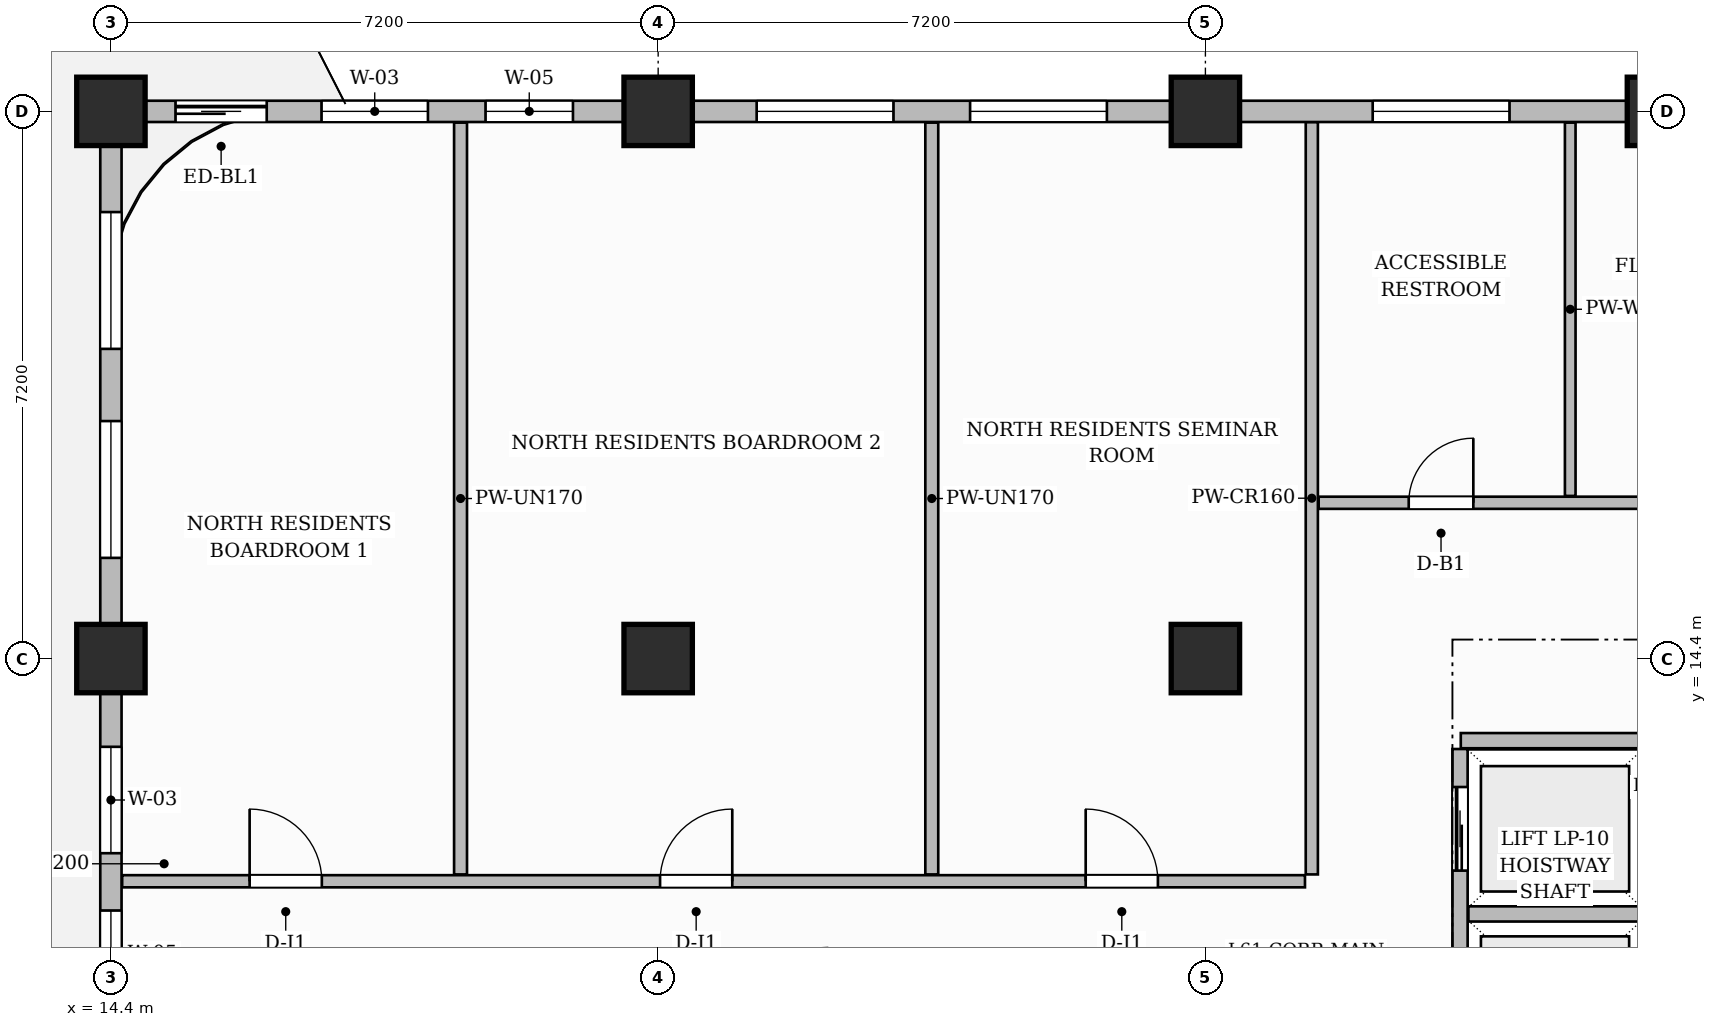
"""IFC4 building model, lengths in metres.
Left out: names, types, materials, properties, quantities, classifications, styles, units other than length and angle.
Written with IfcOpenShell. Run it as: python <this file> out.ifc"""

import sys

from ifc_helpers import new_model, si_unit, direction, frame, frame_2d, origin, origin_2d, place, context, subcontext, project, spatial, rectangle, extrude, source, transform, mapped, element, fill, save


model = new_model("IFC4")
c1 = context("Model", 3, precision=1e-05, world=origin(), true_north=direction((0.0, 1.0)))
c2 = subcontext(c1, "Body", "Model", "MODEL_VIEW")
j1 = project(units=[si_unit("LENGTHUNIT", "METRE"), si_unit("PLANEANGLEUNIT", "RADIAN")], contexts=[c1])
p1 = place(None, origin())
s1 = spatial("IfcSite", under=j1, at=p1, CompositionType="ELEMENT")
p2 = place(p1, origin())
s2 = spatial("IfcBuilding", under=s1, at=p2, CompositionType="ELEMENT")
p3 = place(p2, frame((0.0, 0.0, 244.25)))
s3 = spatial("IfcBuildingStorey", under=s2, at=p3, CompositionType="ELEMENT", Elevation=244.25)
m1 = source(origin(), c2, "Body", "SweptSolid", [
    extrude(rectangle(XDim=0.9, YDim=0.9, at=origin_2d()), origin(), (0.0, 0.0, 1.0), 3.85),
])
for number, where, z_axis, x_axis in (
    (1, (14.4, 14.4, 0.0), (0.0, 0.0, 1.0), (1.0, 0.0, 0.0)),
    (2, (14.4, 21.6, 0.0), (0.0, 0.0, 1.0), (1.0, 0.0, 0.0)),
    (3, (21.6, 14.4, 0.0), (0.0, 0.0, 1.0), (1.0, 0.0, 0.0)),
    (4, (21.6, 21.6, 0.0), (0.0, 0.0, 1.0), (1.0, 0.0, 0.0)),
    (5, (28.8, 14.4, 0.0), (0.0, 0.0, 1.0), (1.0, 0.0, 0.0)),
    (6, (28.8, 21.6, 0.0), (0.0, 0.0, 1.0), (1.0, 0.0, 0.0)),
    (7, (34.8, 21.6, 0.0), (0.0, 0.0, 1.0), (1.0, 0.0, 0.0)),
):
    element("IfcColumn", number, at=place(p3, frame(where, z_axis=z_axis, x_axis=x_axis)), inside=s3, PredefinedType="COLUMN", context=c2, shape_type="MappedRepresentation", body=[
        mapped(m1, transform((0.0, 0.0, 0.0), scale=1.0)),
    ])
p4 = place(p3, frame((32.16, 13.32, 0.0), z_axis=(0.0, 0.0, 1.0), x_axis=(1.0, 0.0, 0.0)))
e8 = element("IfcWall", 8, at=p4, inside=s3, PredefinedType="PARTITIONING", context=c2, shape_type="SweptSolid", body=[
    extrude(rectangle(XDim=2.385, YDim=0.2, at=frame_2d((1.192, 0.0))), origin(), (0.0, 0.0, 1.0), 3.6),
])
p5 = place(p3, frame((32.15, 4.39, 0.0), z_axis=(0.0, 0.0, 1.0), x_axis=(0.0, 1.0, 0.0)))
e9 = element("IfcWall", 9, at=p5, inside=s3, PredefinedType="PARTITIONING", context=c2, shape_type="SweptSolid", body=[
    extrude(rectangle(XDim=8.82, YDim=0.2, at=frame_2d((4.41, 0.0))), origin(), (0.0, 0.0, 1.0), 3.6),
])
p6 = place(p5, frame((0.5, 0.0, 0.0)))
e10 = element("IfcOpeningElement", 10, at=p6, cuts=e9, PredefinedType="OPENING", context=c2, shape_type="SweptSolid", body=[
    extrude(rectangle(XDim=1.1, YDim=2.2, at=frame_2d((0.55, 1.1))), frame((0.0, 0.11, 0.0), z_axis=(0.0, -1.0, 0.0), x_axis=(1.0, 0.0, 0.0)), (0.0, 0.0, 1.0), 0.22),
])
p7 = place(p5, frame((2.74, 0.0, 0.0)))
e11 = element("IfcOpeningElement", 11, at=p7, cuts=e9, PredefinedType="OPENING", context=c2, shape_type="SweptSolid", body=[
    extrude(rectangle(XDim=1.1, YDim=2.2, at=frame_2d((0.55, 1.1))), frame((0.0, 0.11, 0.0), z_axis=(0.0, -1.0, 0.0), x_axis=(1.0, 0.0, 0.0)), (0.0, 0.0, 1.0), 0.22),
])
p8 = place(p5, frame((4.98, 0.0, 0.0)))
e12 = element("IfcOpeningElement", 12, at=p8, cuts=e9, PredefinedType="OPENING", context=c2, shape_type="SweptSolid", body=[
    extrude(rectangle(XDim=1.1, YDim=2.2, at=frame_2d((0.55, 1.1))), frame((0.0, 0.11, 0.0), z_axis=(0.0, -1.0, 0.0), x_axis=(1.0, 0.0, 0.0)), (0.0, 0.0, 1.0), 0.22),
])
p9 = place(p5, frame((7.22, 0.0, 0.0)))
e13 = element("IfcOpeningElement", 13, at=p9, cuts=e9, PredefinedType="OPENING", context=c2, shape_type="SweptSolid", body=[
    extrude(rectangle(XDim=1.1, YDim=2.2, at=frame_2d((0.55, 1.1))), frame((0.0, 0.11, 0.0), z_axis=(0.0, -1.0, 0.0), x_axis=(1.0, 0.0, 0.0)), (0.0, 0.0, 1.0), 0.22),
])
p10 = place(p3, frame((32.26, 11.04, 0.0), z_axis=(0.0, 0.0, 1.0), x_axis=(1.0, 0.0, 0.0)))
e14 = element("IfcWall", 14, at=p10, inside=s3, PredefinedType="PARTITIONING", context=c2, shape_type="SweptSolid", body=[
    extrude(rectangle(XDim=2.255, YDim=0.2, at=frame_2d((1.127, 0.0))), origin(), (0.0, 0.0, 1.0), 3.6),
])
p11 = place(p3, frame((14.548, 11.47, 0.0), z_axis=(0.0, 0.0, 1.0), x_axis=(1.0, 0.0, 0.0)))
e15 = element("IfcWall", 15, at=p11, inside=s3, PredefinedType="PARTITIONING", context=c2, shape_type="SweptSolid", body=[
    extrude(rectangle(XDim=15.562, YDim=0.16, at=frame_2d((7.781, 0.0))), origin(), (0.0, 0.0, 1.0), 3.6),
])
p12 = place(p11, frame((1.677, 0.0, 0.0)))
e16 = element("IfcOpeningElement", 16, at=p12, cuts=e15, PredefinedType="OPENING", context=c2, shape_type="SweptSolid", body=[
    extrude(rectangle(XDim=0.95, YDim=2.15, at=frame_2d((0.475, 1.075))), frame((0.0, 0.09, 0.0), z_axis=(0.0, -1.0, 0.0), x_axis=(1.0, 0.0, 0.0)), (0.0, 0.0, 1.0), 0.18),
])
p13 = place(p11, frame((7.077, 0.0, 0.0)))
e17 = element("IfcOpeningElement", 17, at=p13, cuts=e15, PredefinedType="OPENING", context=c2, shape_type="SweptSolid", body=[
    extrude(rectangle(XDim=0.95, YDim=2.15, at=frame_2d((0.475, 1.075))), frame((0.0, 0.09, 0.0), z_axis=(0.0, -1.0, 0.0), x_axis=(1.0, 0.0, 0.0)), (0.0, 0.0, 1.0), 0.18),
])
p14 = place(p11, frame((12.677, 0.0, 0.0)))
e18 = element("IfcOpeningElement", 18, at=p14, cuts=e15, PredefinedType="OPENING", context=c2, shape_type="SweptSolid", body=[
    extrude(rectangle(XDim=0.95, YDim=2.15, at=frame_2d((0.475, 1.075))), frame((0.0, 0.09, 0.0), z_axis=(0.0, -1.0, 0.0), x_axis=(1.0, 0.0, 0.0)), (0.0, 0.0, 1.0), 0.18),
])
p15 = place(p3, frame((30.2, 11.56, 0.0), z_axis=(0.0, 0.0, 1.0), x_axis=(0.0, 1.0, 0.0)))
e19 = element("IfcWall", 19, at=p15, inside=s3, PredefinedType="PARTITIONING", context=c2, shape_type="SweptSolid", body=[
    extrude(rectangle(XDim=9.9, YDim=0.16, at=frame_2d((4.95, 0.0))), origin(), (0.0, 0.0, 1.0), 3.6),
])
p16 = place(p3, frame((30.29, 16.45, 0.0), z_axis=(0.0, 0.0, 1.0), x_axis=(1.0, 0.0, 0.0)))
e20 = element("IfcWall", 20, at=p16, inside=s3, PredefinedType="PARTITIONING", context=c2, shape_type="SweptSolid", body=[
    extrude(rectangle(XDim=19.37, YDim=0.16, at=frame_2d((9.685, 0.0))), origin(), (0.0, 0.0, 1.0), 3.6),
])
p17 = place(p16, frame((1.185, 0.0, 0.0)))
e21 = element("IfcOpeningElement", 21, at=p17, cuts=e20, PredefinedType="OPENING", context=c2, shape_type="SweptSolid", body=[
    extrude(rectangle(XDim=0.85, YDim=2.1, at=frame_2d((0.425, 1.05))), frame((0.0, 0.09, 0.0), z_axis=(0.0, -1.0, 0.0), x_axis=(1.0, 0.0, 0.0)), (0.0, 0.0, 1.0), 0.18),
])
p18 = place(p16, frame((6.66, 0.0, 0.0)))
e22 = element("IfcOpeningElement", 22, at=p18, cuts=e20, PredefinedType="OPENING", context=c2, shape_type="SweptSolid", body=[
    extrude(rectangle(XDim=0.9, YDim=2.15, at=frame_2d((0.45, 1.075))), frame((0.0, 0.09, 0.0), z_axis=(0.0, -1.0, 0.0), x_axis=(1.0, 0.0, 0.0)), (0.0, 0.0, 1.0), 0.18),
])
p19 = place(p16, frame((14.46, 0.0, 0.0)))
e23 = element("IfcOpeningElement", 23, at=p19, cuts=e20, PredefinedType="OPENING", context=c2, shape_type="SweptSolid", body=[
    extrude(rectangle(XDim=1.4, YDim=2.35, at=frame_2d((0.7, 1.175))), frame((0.0, 0.09, 0.0), z_axis=(0.0, -1.0, 0.0), x_axis=(1.0, 0.0, 0.0)), (0.0, 0.0, 1.0), 0.18),
])
p20 = place(p3, frame((33.6, 16.54, 0.0), z_axis=(0.0, 0.0, 1.0), x_axis=(0.0, 1.0, 0.0)))
e24 = element("IfcWall", 24, at=p20, inside=s3, PredefinedType="PARTITIONING", context=c2, shape_type="SweptSolid", body=[
    extrude(rectangle(XDim=4.912, YDim=0.14, at=frame_2d((2.456, 0.0))), origin(), (0.0, 0.0, 1.0), 3.6),
])
p21 = place(p3, frame((19.0, 11.56, 0.0), z_axis=(0.0, 0.0, 1.0), x_axis=(0.0, 1.0, 0.0)))
e25 = element("IfcWall", 25, at=p21, inside=s3, PredefinedType="PARTITIONING", context=c2, shape_type="SweptSolid", body=[
    extrude(rectangle(XDim=9.892, YDim=0.17, at=frame_2d((4.946, 0.0))), origin(), (0.0, 0.0, 1.0), 3.6),
])
p22 = place(p3, frame((25.2, 11.56, 0.0), z_axis=(0.0, 0.0, 1.0), x_axis=(0.0, 1.0, 0.0)))
e26 = element("IfcWall", 26, at=p22, inside=s3, PredefinedType="PARTITIONING", context=c2, shape_type="SweptSolid", body=[
    extrude(rectangle(XDim=9.892, YDim=0.17, at=frame_2d((4.946, 0.0))), origin(), (0.0, 0.0, 1.0), 3.315),
])
p23 = place(p3, frame((14.4, 21.6, 0.0), z_axis=(0.0, 0.0, 1.0), x_axis=(1.0, 0.0, 0.0)))
e27 = element("IfcWall", 27, at=p23, inside=s3, PredefinedType="SOLIDWALL", context=c2, shape_type="SweptSolid", body=[
    extrude(rectangle(XDim=35.4, YDim=0.28, at=frame_2d((17.7, 0.0))), origin(), (0.0, 0.0, 1.0), 3.135),
])
p24 = place(p23, frame((0.85, 0.0, 0.0)))
e28 = element("IfcOpeningElement", 28, at=p24, cuts=e27, PredefinedType="OPENING", context=c2, shape_type="SweptSolid", body=[
    extrude(rectangle(XDim=1.2, YDim=2.2, at=frame_2d((0.6, 1.1))), frame((0.0, 0.15, 0.0), z_axis=(0.0, -1.0, 0.0), x_axis=(1.0, 0.0, 0.0)), (0.0, 0.0, 1.0), 0.3),
])
p25 = place(p23, frame((2.771, 0.0, 0.8)))
e29 = element("IfcOpeningElement", 29, at=p25, cuts=e27, PredefinedType="OPENING", context=c2, shape_type="SweptSolid", body=[
    extrude(rectangle(XDim=1.4, YDim=1.85, at=frame_2d((0.7, 0.925))), frame((0.0, 0.15, 0.0), z_axis=(0.0, -1.0, 0.0), x_axis=(1.0, 0.0, 0.0)), (0.0, 0.0, 1.0), 0.3),
])
p26 = place(p23, frame((4.929, 0.0, 0.8)))
e30 = element("IfcOpeningElement", 30, at=p26, cuts=e27, PredefinedType="OPENING", context=c2, shape_type="SweptSolid", body=[
    extrude(rectangle(XDim=1.15, YDim=1.8, at=frame_2d((0.575, 0.9))), frame((0.0, 0.15, 0.0), z_axis=(0.0, -1.0, 0.0), x_axis=(1.0, 0.0, 0.0)), (0.0, 0.0, 1.0), 0.3),
])
p27 = place(p23, frame((8.496, 0.0, 0.8)))
e31 = element("IfcOpeningElement", 31, at=p27, cuts=e27, PredefinedType="OPENING", context=c2, shape_type="SweptSolid", body=[
    extrude(rectangle(XDim=1.8, YDim=1.85, at=frame_2d((0.9, 0.925))), frame((0.0, 0.15, 0.0), z_axis=(0.0, -1.0, 0.0), x_axis=(1.0, 0.0, 0.0)), (0.0, 0.0, 1.0), 0.3),
])
p28 = place(p23, frame((11.304, 0.0, 0.8)))
e32 = element("IfcOpeningElement", 32, at=p28, cuts=e27, PredefinedType="OPENING", context=c2, shape_type="SweptSolid", body=[
    extrude(rectangle(XDim=1.8, YDim=1.85, at=frame_2d((0.9, 0.925))), frame((0.0, 0.15, 0.0), z_axis=(0.0, -1.0, 0.0), x_axis=(1.0, 0.0, 0.0)), (0.0, 0.0, 1.0), 0.3),
])
p29 = place(p23, frame((16.601, 0.0, 0.8)))
e33 = element("IfcOpeningElement", 33, at=p29, cuts=e27, PredefinedType="OPENING", context=c2, shape_type="SweptSolid", body=[
    extrude(rectangle(XDim=1.8, YDim=1.85, at=frame_2d((0.9, 0.925))), frame((0.0, 0.15, 0.0), z_axis=(0.0, -1.0, 0.0), x_axis=(1.0, 0.0, 0.0)), (0.0, 0.0, 1.0), 0.3),
])
p30 = place(p23, frame((21.723, 0.0, 0.8)))
e34 = element("IfcOpeningElement", 34, at=p30, cuts=e27, PredefinedType="OPENING", context=c2, shape_type="SweptSolid", body=[
    extrude(rectangle(XDim=1.8, YDim=1.85, at=frame_2d((0.9, 0.925))), frame((0.0, 0.15, 0.0), z_axis=(0.0, -1.0, 0.0), x_axis=(1.0, 0.0, 0.0)), (0.0, 0.0, 1.0), 0.3),
])
p31 = place(p23, frame((24.469, 0.0, 0.8)))
e35 = element("IfcOpeningElement", 35, at=p31, cuts=e27, PredefinedType="OPENING", context=c2, shape_type="SweptSolid", body=[
    extrude(rectangle(XDim=1.8, YDim=1.85, at=frame_2d((0.9, 0.925))), frame((0.0, 0.15, 0.0), z_axis=(0.0, -1.0, 0.0), x_axis=(1.0, 0.0, 0.0)), (0.0, 0.0, 1.0), 0.3),
])
p32 = place(p23, frame((29.075, 0.0, 0.8)))
e36 = element("IfcOpeningElement", 36, at=p32, cuts=e27, PredefinedType="OPENING", context=c2, shape_type="SweptSolid", body=[
    extrude(rectangle(XDim=1.8, YDim=1.85, at=frame_2d((0.9, 0.925))), frame((0.0, 0.15, 0.0), z_axis=(0.0, -1.0, 0.0), x_axis=(1.0, 0.0, 0.0)), (0.0, 0.0, 1.0), 0.3),
])
p33 = place(p23, frame((32.125, 0.0, 0.8)))
e37 = element("IfcOpeningElement", 37, at=p33, cuts=e27, PredefinedType="OPENING", context=c2, shape_type="SweptSolid", body=[
    extrude(rectangle(XDim=1.8, YDim=1.85, at=frame_2d((0.9, 0.925))), frame((0.0, 0.15, 0.0), z_axis=(0.0, -1.0, 0.0), x_axis=(1.0, 0.0, 0.0)), (0.0, 0.0, 1.0), 0.3),
])
p34 = place(p3, frame((14.4, 0.05, 0.0), z_axis=(0.0, 0.0, 1.0), x_axis=(0.0, 1.0, 0.0)))
e38 = element("IfcWall", 38, at=p34, inside=s3, PredefinedType="SOLIDWALL", context=c2, shape_type="SweptSolid", body=[
    extrude(rectangle(XDim=21.5, YDim=0.28, at=frame_2d((10.75, 0.0))), origin(), (0.0, 0.0, 1.0), 3.135),
])
p35 = place(p34, frame((1.275, 0.0, 0.8)))
e39 = element("IfcOpeningElement", 39, at=p35, cuts=e38, PredefinedType="OPENING", context=c2, shape_type="SweptSolid", body=[
    extrude(rectangle(XDim=1.8, YDim=1.85, at=frame_2d((0.9, 0.925))), frame((0.0, 0.15, 0.0), z_axis=(0.0, -1.0, 0.0), x_axis=(1.0, 0.0, 0.0)), (0.0, 0.0, 1.0), 0.3),
])
p36 = place(p34, frame((4.025, 0.0, 0.8)))
e40 = element("IfcOpeningElement", 40, at=p36, cuts=e38, PredefinedType="OPENING", context=c2, shape_type="SweptSolid", body=[
    extrude(rectangle(XDim=1.8, YDim=1.85, at=frame_2d((0.9, 0.925))), frame((0.0, 0.15, 0.0), z_axis=(0.0, -1.0, 0.0), x_axis=(1.0, 0.0, 0.0)), (0.0, 0.0, 1.0), 0.3),
])
p37 = place(p34, frame((8.246, 0.0, 0.8)))
e41 = element("IfcOpeningElement", 41, at=p37, cuts=e38, PredefinedType="OPENING", context=c2, shape_type="SweptSolid", body=[
    extrude(rectangle(XDim=0.95, YDim=1.75, at=frame_2d((0.475, 0.875))), frame((0.0, 0.15, 0.0), z_axis=(0.0, -1.0, 0.0), x_axis=(1.0, 0.0, 0.0)), (0.0, 0.0, 1.0), 0.3),
])
p38 = place(p34, frame((9.885, 0.0, 0.8)))
e42 = element("IfcOpeningElement", 42, at=p38, cuts=e38, PredefinedType="OPENING", context=c2, shape_type="SweptSolid", body=[
    extrude(rectangle(XDim=1.15, YDim=1.8, at=frame_2d((0.575, 0.9))), frame((0.0, 0.15, 0.0), z_axis=(0.0, -1.0, 0.0), x_axis=(1.0, 0.0, 0.0)), (0.0, 0.0, 1.0), 0.3),
])
p39 = place(p34, frame((11.789, 0.0, 0.8)))
e43 = element("IfcOpeningElement", 43, at=p39, cuts=e38, PredefinedType="OPENING", context=c2, shape_type="SweptSolid", body=[
    extrude(rectangle(XDim=1.4, YDim=1.85, at=frame_2d((0.7, 0.925))), frame((0.0, 0.15, 0.0), z_axis=(0.0, -1.0, 0.0), x_axis=(1.0, 0.0, 0.0)), (0.0, 0.0, 1.0), 0.3),
])
p40 = place(p34, frame((15.675, 0.0, 0.8)))
e44 = element("IfcOpeningElement", 44, at=p40, cuts=e38, PredefinedType="OPENING", context=c2, shape_type="SweptSolid", body=[
    extrude(rectangle(XDim=1.8, YDim=1.85, at=frame_2d((0.9, 0.925))), frame((0.0, 0.15, 0.0), z_axis=(0.0, -1.0, 0.0), x_axis=(1.0, 0.0, 0.0)), (0.0, 0.0, 1.0), 0.3),
])
p41 = place(p34, frame((18.425, 0.0, 0.8)))
e45 = element("IfcOpeningElement", 45, at=p41, cuts=e38, PredefinedType="OPENING", context=c2, shape_type="SweptSolid", body=[
    extrude(rectangle(XDim=1.8, YDim=1.85, at=frame_2d((0.9, 0.925))), frame((0.0, 0.15, 0.0), z_axis=(0.0, -1.0, 0.0), x_axis=(1.0, 0.0, 0.0)), (0.0, 0.0, 1.0), 0.3),
])
m2 = source(origin(), c2, "Body", "SweptSolid", [
    extrude(rectangle(XDim=0.85, YDim=2.1, at=frame_2d((0.425, 1.05))), frame((0.0, 0.025, 0.0), z_axis=(0.0, -1.0, 0.0), x_axis=(1.0, 0.0, 0.0)), (0.0, 0.0, 1.0), 0.05),
])
p42 = place(p17, origin())
e46 = element("IfcDoor", 46, at=p42, inside=s3, OperationType="SINGLE_SWING_RIGHT", PredefinedType="DOOR", context=c2, shape_type="MappedRepresentation", body=[
    mapped(m2, transform((0.0, 0.0, 0.0), scale=1.0)),
])
fill(e21, e46)
m3 = source(origin(), c2, "Body", "SweptSolid", [
    extrude(rectangle(XDim=0.95, YDim=2.15, at=frame_2d((0.475, 1.075))), frame((0.0, 0.025, 0.0), z_axis=(0.0, -1.0, 0.0), x_axis=(1.0, 0.0, 0.0)), (0.0, 0.0, 1.0), 0.05),
])
p43 = place(p12, origin())
e47 = element("IfcDoor", 47, at=p43, inside=s3, OperationType="SINGLE_SWING_LEFT", PredefinedType="DOOR", context=c2, shape_type="MappedRepresentation", body=[
    mapped(m3, transform((0.0, 0.0, 0.0), scale=1.0)),
])
fill(e16, e47)
p44 = place(p13, origin())
e48 = element("IfcDoor", 48, at=p44, inside=s3, OperationType="SINGLE_SWING_RIGHT", PredefinedType="DOOR", context=c2, shape_type="MappedRepresentation", body=[
    mapped(m3, transform((0.0, 0.0, 0.0), scale=1.0)),
])
fill(e17, e48)
p45 = place(p14, origin())
e49 = element("IfcDoor", 49, at=p45, inside=s3, OperationType="SINGLE_SWING_LEFT", PredefinedType="DOOR", context=c2, shape_type="MappedRepresentation", body=[
    mapped(m3, transform((0.0, 0.0, 0.0), scale=1.0)),
])
fill(e18, e49)
m4 = source(origin(), c2, "Body", "SweptSolid", [
    extrude(rectangle(XDim=1.1, YDim=2.2, at=frame_2d((0.55, 1.1))), frame((0.0, 0.025, 0.0), z_axis=(0.0, -1.0, 0.0), x_axis=(1.0, 0.0, 0.0)), (0.0, 0.0, 1.0), 0.05),
])
p46 = place(p9, origin())
e50 = element("IfcDoor", 50, at=p46, inside=s3, OperationType="SLIDING_TO_LEFT", PredefinedType="DOOR", context=c2, shape_type="MappedRepresentation", body=[
    mapped(m4, transform((0.0, 0.0, 0.0), scale=1.0)),
])
fill(e13, e50)
m5 = source(origin(), c2, "Body", "SweptSolid", [
    extrude(rectangle(XDim=1.2, YDim=2.2, at=frame_2d((0.6, 1.1))), frame((0.0, 0.025, 0.0), z_axis=(0.0, -1.0, 0.0), x_axis=(1.0, 0.0, 0.0)), (0.0, 0.0, 1.0), 0.05),
])
p47 = place(p24, origin())
e51 = element("IfcDoor", 51, at=p47, inside=s3, OperationType="SLIDING_TO_LEFT", PredefinedType="DOOR", context=c2, shape_type="MappedRepresentation", body=[
    mapped(m5, transform((0.0, 0.0, 0.0), scale=1.0)),
])
fill(e28, e51)
m6 = source(origin(), c2, "Body", "SweptSolid", [
    extrude(rectangle(XDim=1.4, YDim=1.85, at=frame_2d((0.7, 0.925))), frame((0.0, 0.03, 0.0), z_axis=(0.0, -1.0, 0.0), x_axis=(1.0, 0.0, 0.0)), (0.0, 0.0, 1.0), 0.06),
])
p48 = place(p25, origin())
e52 = element("IfcWindow", 52, at=p48, inside=s3, PartitioningType="SINGLE_PANEL", PredefinedType="WINDOW", context=c2, shape_type="MappedRepresentation", body=[
    mapped(m6, transform((0.0, 0.0, 0.0), scale=1.0)),
])
fill(e29, e52)
m7 = source(origin(), c2, "Body", "SweptSolid", [
    extrude(rectangle(XDim=1.15, YDim=1.8, at=frame_2d((0.575, 0.9))), frame((0.0, 0.03, 0.0), z_axis=(0.0, -1.0, 0.0), x_axis=(1.0, 0.0, 0.0)), (0.0, 0.0, 1.0), 0.06),
])
p49 = place(p26, origin())
e53 = element("IfcWindow", 53, at=p49, inside=s3, PartitioningType="SINGLE_PANEL", PredefinedType="WINDOW", context=c2, shape_type="MappedRepresentation", body=[
    mapped(m7, transform((0.0, 0.0, 0.0), scale=1.0)),
])
fill(e30, e53)
m8 = source(origin(), c2, "Body", "SweptSolid", [
    extrude(rectangle(XDim=1.8, YDim=1.85, at=frame_2d((0.9, 0.925))), frame((0.0, 0.03, 0.0), z_axis=(0.0, -1.0, 0.0), x_axis=(1.0, 0.0, 0.0)), (0.0, 0.0, 1.0), 0.06),
])
p50 = place(p27, origin())
e54 = element("IfcWindow", 54, at=p50, inside=s3, PartitioningType="DOUBLE_PANEL_VERTICAL", PredefinedType="WINDOW", context=c2, shape_type="MappedRepresentation", body=[
    mapped(m8, transform((0.0, 0.0, 0.0), scale=1.0)),
])
fill(e31, e54)
p51 = place(p28, origin())
e55 = element("IfcWindow", 55, at=p51, inside=s3, PartitioningType="DOUBLE_PANEL_VERTICAL", PredefinedType="WINDOW", context=c2, shape_type="MappedRepresentation", body=[
    mapped(m8, transform((0.0, 0.0, 0.0), scale=1.0)),
])
fill(e32, e55)
p52 = place(p29, origin())
e56 = element("IfcWindow", 56, at=p52, inside=s3, PartitioningType="DOUBLE_PANEL_VERTICAL", PredefinedType="WINDOW", context=c2, shape_type="MappedRepresentation", body=[
    mapped(m8, transform((0.0, 0.0, 0.0), scale=1.0)),
])
fill(e33, e56)
p53 = place(p38, origin())
e57 = element("IfcWindow", 57, at=p53, inside=s3, PartitioningType="SINGLE_PANEL", PredefinedType="WINDOW", context=c2, shape_type="MappedRepresentation", body=[
    mapped(m7, transform((0.0, 0.0, 0.0), scale=1.0)),
])
fill(e42, e57)
p54 = place(p39, origin())
e58 = element("IfcWindow", 58, at=p54, inside=s3, PartitioningType="SINGLE_PANEL", PredefinedType="WINDOW", context=c2, shape_type="MappedRepresentation", body=[
    mapped(m6, transform((0.0, 0.0, 0.0), scale=1.0)),
])
fill(e43, e58)
p55 = place(p40, origin())
e59 = element("IfcWindow", 59, at=p55, inside=s3, PartitioningType="DOUBLE_PANEL_VERTICAL", PredefinedType="WINDOW", context=c2, shape_type="MappedRepresentation", body=[
    mapped(m8, transform((0.0, 0.0, 0.0), scale=1.0)),
])
fill(e44, e59)
p56 = place(p41, origin())
e60 = element("IfcWindow", 60, at=p56, inside=s3, PartitioningType="DOUBLE_PANEL_VERTICAL", PredefinedType="WINDOW", context=c2, shape_type="MappedRepresentation", body=[
    mapped(m8, transform((0.0, 0.0, 0.0), scale=1.0)),
])
fill(e45, e60)
save(model, sys.argv[1])
